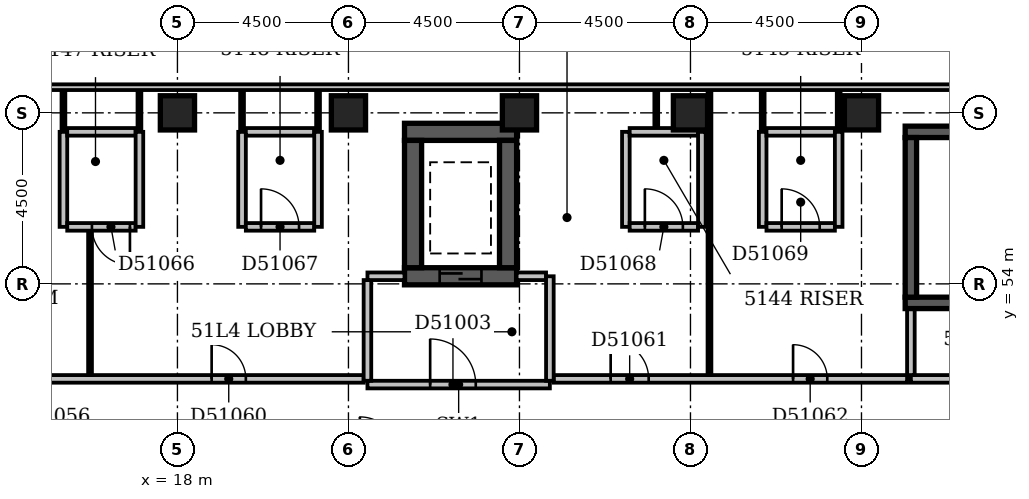
"""IFC4 building model, lengths in metres.
Left out: names, types, materials, properties, quantities, classifications, styles, units other than length and angle.
Written with IfcOpenShell. Run it as: python <this file> out.ifc"""

import sys

from ifc_helpers import new_model, si_unit, direction, frame, frame_2d, origin, origin_2d, place, context, subcontext, project, spatial, rectangle, extrude, element, fill, save


model = new_model("IFC4")
c1 = context("Model", 3, precision=1e-05, world=origin(), true_north=direction((0.0, 1.0)))
c2 = subcontext(c1, "Body", "Model", "MODEL_VIEW")
j1 = project(units=[si_unit("LENGTHUNIT", "METRE"), si_unit("PLANEANGLEUNIT", "RADIAN")], contexts=[c1])
p1 = place(None, origin())
s1 = spatial("IfcSite", under=j1, at=p1, CompositionType="ELEMENT")
p2 = place(p1, origin())
s2 = spatial("IfcBuilding", under=s1, at=p2, CompositionType="ELEMENT")
p3 = place(p2, frame((0.0, 0.0, 200.6)))
s3 = spatial("IfcBuildingStorey", under=s2, at=p3, CompositionType="ELEMENT", Elevation=200.6)
p4 = place(p3, frame((23.975, 54.2, -0.3), z_axis=(0.0, 0.0, 1.0), x_axis=(1.0, 0.0, 0.0)))
e1 = element("IfcWall", 1, at=p4, inside=s3, PredefinedType="SHEAR", context=c2, shape_type="SweptSolid", body=[
    extrude(rectangle(XDim=2.95, YDim=0.45, at=frame_2d((1.475, 0.0))), origin(), (0.0, 0.0, 1.0), 3.6),
])
p5 = place(p4, frame((0.925, 0.0, 0.3)))
e2 = element("IfcOpeningElement", 2, at=p5, cuts=e1, PredefinedType="OPENING", context=c2, shape_type="SweptSolid", body=[
    extrude(rectangle(XDim=1.1, YDim=2.1, at=frame_2d((0.55, 1.05))), frame((0.0, 0.237, 0.0), z_axis=(0.0, -1.0, 0.0), x_axis=(1.0, 0.0, 0.0)), (0.0, 0.0, 1.0), 0.474),
])
p6 = place(p3, frame((23.975, 58.0, -0.3), z_axis=(0.0, 0.0, 1.0), x_axis=(1.0, 0.0, 0.0)))
e3 = element("IfcWall", 3, at=p6, inside=s3, PredefinedType="SHEAR", context=c2, shape_type="SweptSolid", body=[
    extrude(rectangle(XDim=2.95, YDim=0.45, at=frame_2d((1.475, 0.0))), origin(), (0.0, 0.0, 1.0), 3.6),
])
for number, where, z_axis, x_axis in (
    (4, (24.2, 54.425, -0.3), (0.0, 0.0, 1.0), (0.0, 1.0, 0.0)),
    (5, (26.7, 54.425, -0.3), (0.0, 0.0, 1.0), (0.0, 1.0, 0.0)),
):
    element("IfcWall", number, at=place(p3, frame(where, z_axis=z_axis, x_axis=x_axis)), inside=s3, PredefinedType="SHEAR", context=c2, shape_type="SweptSolid", body=[
        extrude(rectangle(XDim=3.35, YDim=0.45, at=frame_2d((1.675, 0.0))), origin(), (0.0, 0.0, 1.0), 3.6),
    ])
p7 = place(p3, frame((37.15, 53.5, -0.3), z_axis=(0.0, 0.0, 1.0), x_axis=(1.0, 0.0, 0.0)))
e6 = element("IfcWall", 6, at=p7, inside=s3, PredefinedType="SHEAR", context=c2, shape_type="SweptSolid", body=[
    extrude(rectangle(XDim=7.0, YDim=0.3, at=frame_2d((3.5, 0.0))), origin(), (0.0, 0.0, 1.0), 3.6),
])
p8 = place(p7, frame((5.58, 0.0, 0.3)))
e7 = element("IfcOpeningElement", 7, at=p8, cuts=e6, PredefinedType="OPENING", context=c2, shape_type="SweptSolid", body=[
    extrude(rectangle(XDim=1.1, YDim=2.1, at=frame_2d((0.55, 1.05))), frame((0.0, 0.162, 0.0), z_axis=(0.0, -1.0, 0.0), x_axis=(1.0, 0.0, 0.0)), (0.0, 0.0, 1.0), 0.324),
])
p9 = place(p3, frame((37.15, 58.0, -0.3), z_axis=(0.0, 0.0, 1.0), x_axis=(1.0, 0.0, 0.0)))
e8 = element("IfcWall", 8, at=p9, inside=s3, PredefinedType="SHEAR", context=c2, shape_type="SweptSolid", body=[
    extrude(rectangle(XDim=7.4, YDim=0.3, at=frame_2d((3.7, 0.0))), origin(), (0.0, 0.0, 1.0), 3.6),
])
p10 = place(p3, frame((37.3, 53.65, -0.3), z_axis=(0.0, 0.0, 1.0), x_axis=(0.0, 1.0, 0.0)))
e9 = element("IfcWall", 9, at=p10, inside=s3, PredefinedType="SHEAR", context=c2, shape_type="SweptSolid", body=[
    extrude(rectangle(XDim=4.2, YDim=0.3, at=frame_2d((2.1, 0.0))), origin(), (0.0, 0.0, 1.0), 3.6),
])
for number, where, z_axis, x_axis in (
    (10, (18.0, 58.5, -0.3), (0.0, 0.0, 1.0), (1.0, 0.0, 0.0)),
    (11, (22.5, 58.5, -0.3), (0.0, 0.0, 1.0), (1.0, 0.0, 0.0)),
    (12, (27.0, 58.5, -0.3), (0.0, 0.0, 1.0), (1.0, 0.0, 0.0)),
    (13, (31.5, 58.5, -0.3), (0.0, 0.0, 1.0), (1.0, 0.0, 0.0)),
    (14, (36.0, 58.5, -0.3), (0.0, 0.0, 1.0), (1.0, 0.0, 0.0)),
):
    element("IfcColumn", number, at=place(p3, frame(where, z_axis=z_axis, x_axis=x_axis)), inside=s3, PredefinedType="COLUMN", context=c2, shape_type="SweptSolid", body=[
        extrude(rectangle(XDim=0.9, YDim=0.9, at=origin_2d()), origin(), (0.0, 0.0, 1.0), 3.6),
    ])
p11 = place(p3, frame((50.1, 59.175, 0.0), z_axis=(0.0, 0.0, 1.0), x_axis=(-1.0, 0.0, 0.0)))
e15 = element("IfcWall", 15, at=p11, inside=s3, PredefinedType="STANDARD", context=c2, shape_type="SweptSolid", body=[
    extrude(rectangle(XDim=50.85, YDim=0.15, at=frame_2d((25.425, 0.0))), origin(), (0.0, 0.0, 1.0), 2.7),
])
p12 = place(p3, frame((23.0, 51.35, 0.0), z_axis=(0.0, 0.0, 1.0), x_axis=(1.0, 0.0, 0.0)))
e16 = element("IfcWall", 16, at=p12, inside=s3, PredefinedType="PARTITIONING", context=c2, shape_type="SweptSolid", body=[
    extrude(rectangle(XDim=4.8, YDim=0.2, at=frame_2d((2.4, 0.0))), origin(), (0.0, 0.0, 1.0), 3.3),
])
p13 = place(p12, frame((1.65, 0.0, 0.0)))
e17 = element("IfcOpeningElement", 17, at=p13, cuts=e16, PredefinedType="OPENING", context=c2, shape_type="SweptSolid", body=[
    extrude(rectangle(XDim=1.2, YDim=2.1, at=frame_2d((0.6, 1.05))), frame((0.0, 0.112, 0.0), z_axis=(0.0, -1.0, 0.0), x_axis=(1.0, 0.0, 0.0)), (0.0, 0.0, 1.0), 0.224),
])
p14 = place(p3, frame((27.8, 51.45, 0.0), z_axis=(0.0, 0.0, 1.0), x_axis=(0.0, 1.0, 0.0)))
e18 = element("IfcWall", 18, at=p14, inside=s3, PredefinedType="PARTITIONING", context=c2, shape_type="SweptSolid", body=[
    extrude(rectangle(XDim=2.75, YDim=0.2, at=frame_2d((1.375, 0.0))), origin(), (0.0, 0.0, 1.0), 3.3),
])
p15 = place(p3, frame((23.0, 54.2, 0.0), z_axis=(0.0, 0.0, 1.0), x_axis=(1.0, 0.0, 0.0)))
e19 = element("IfcWall", 19, at=p15, inside=s3, PredefinedType="PARTITIONING", context=c2, shape_type="SweptSolid", body=[
    extrude(rectangle(XDim=0.975, YDim=0.2, at=frame_2d((0.488, 0.0))), origin(), (0.0, 0.0, 1.0), 3.3),
])
p16 = place(p3, frame((26.925, 54.2, 0.0), z_axis=(0.0, 0.0, 1.0), x_axis=(1.0, 0.0, 0.0)))
e20 = element("IfcWall", 20, at=p16, inside=s3, PredefinedType="PARTITIONING", context=c2, shape_type="SweptSolid", body=[
    extrude(rectangle(XDim=0.775, YDim=0.2, at=frame_2d((0.387, 0.0))), origin(), (0.0, 0.0, 1.0), 3.3),
])
p17 = place(p3, frame((23.0, 51.45, 0.0), z_axis=(0.0, 0.0, 1.0), x_axis=(0.0, 1.0, 0.0)))
e21 = element("IfcWall", 21, at=p17, inside=s3, PredefinedType="PARTITIONING", context=c2, shape_type="SweptSolid", body=[
    extrude(rectangle(XDim=2.65, YDim=0.2, at=frame_2d((1.325, 0.0))), origin(), (0.0, 0.0, 1.0), 3.3),
])
p18 = place(p3, frame((37.3, 51.5, 0.0), z_axis=(0.0, 0.0, 1.0), x_axis=(1.0, 0.0, 0.0)))
e22 = element("IfcWall", 22, at=p18, inside=s3, PredefinedType="PARTITIONING", context=c2, shape_type="SweptSolid", body=[
    extrude(rectangle(XDim=6.7, YDim=0.2, at=frame_2d((3.35, 0.0))), origin(), (0.0, 0.0, 1.0), 3.3),
])
p19 = place(p18, frame((2.75, 0.0, 0.0)))
e23 = element("IfcOpeningElement", 23, at=p19, cuts=e22, PredefinedType="OPENING", context=c2, shape_type="SweptSolid", body=[
    extrude(rectangle(XDim=1.2, YDim=2.1, at=frame_2d((0.6, 1.05))), frame((0.0, 0.112, 0.0), z_axis=(0.0, -1.0, 0.0), x_axis=(1.0, 0.0, 0.0)), (0.0, 0.0, 1.0), 0.224),
])
p20 = place(p3, frame((37.3, 51.6, 0.0), z_axis=(0.0, 0.0, 1.0), x_axis=(0.0, 1.0, 0.0)))
e24 = element("IfcWall", 24, at=p20, inside=s3, PredefinedType="PARTITIONING", context=c2, shape_type="SweptSolid", body=[
    extrude(rectangle(XDim=1.73, YDim=0.2, at=frame_2d((0.865, 0.0))), origin(), (0.0, 0.0, 1.0), 3.3),
])
p21 = place(p3, frame((7.6, 51.5, 0.0), z_axis=(0.0, 0.0, 1.0), x_axis=(1.0, 0.0, 0.0)))
e25 = element("IfcWall", 25, at=p21, inside=s3, PredefinedType="PARTITIONING", context=c2, shape_type="SweptSolid", body=[
    extrude(rectangle(XDim=15.3, YDim=0.2, at=frame_2d((7.65, 0.0))), origin(), (0.0, 0.0, 1.0), 3.3),
])
p22 = place(p21, frame((3.55, 0.0, 0.0)))
e26 = element("IfcOpeningElement", 26, at=p22, cuts=e25, PredefinedType="OPENING", context=c2, shape_type="SweptSolid", body=[
    extrude(rectangle(XDim=0.9, YDim=2.1, at=frame_2d((0.45, 1.05))), frame((0.0, 0.112, 0.0), z_axis=(0.0, -1.0, 0.0), x_axis=(1.0, 0.0, 0.0)), (0.0, 0.0, 1.0), 0.224),
])
p23 = place(p21, frame((11.3, 0.0, 0.0)))
e27 = element("IfcOpeningElement", 27, at=p23, cuts=e25, PredefinedType="OPENING", context=c2, shape_type="SweptSolid", body=[
    extrude(rectangle(XDim=0.9, YDim=2.1, at=frame_2d((0.45, 1.05))), frame((0.0, 0.112, 0.0), z_axis=(0.0, -1.0, 0.0), x_axis=(1.0, 0.0, 0.0)), (0.0, 0.0, 1.0), 0.224),
])
p24 = place(p3, frame((27.9, 51.5, 0.0), z_axis=(0.0, 0.0, 1.0), x_axis=(1.0, 0.0, 0.0)))
e28 = element("IfcWall", 28, at=p24, inside=s3, PredefinedType="PARTITIONING", context=c2, shape_type="SweptSolid", body=[
    extrude(rectangle(XDim=9.3, YDim=0.2, at=frame_2d((4.65, 0.0))), origin(), (0.0, 0.0, 1.0), 3.3),
])
p25 = place(p24, frame((1.5, 0.0, 0.0)))
e29 = element("IfcOpeningElement", 29, at=p25, cuts=e28, PredefinedType="OPENING", context=c2, shape_type="SweptSolid", body=[
    extrude(rectangle(XDim=1.0, YDim=2.1, at=frame_2d((0.5, 1.05))), frame((0.0, 0.112, 0.0), z_axis=(0.0, -1.0, 0.0), x_axis=(1.0, 0.0, 0.0)), (0.0, 0.0, 1.0), 0.224),
])
p26 = place(p24, frame((6.3, 0.0, 0.0)))
e30 = element("IfcOpeningElement", 30, at=p26, cuts=e28, PredefinedType="OPENING", context=c2, shape_type="SweptSolid", body=[
    extrude(rectangle(XDim=0.9, YDim=2.1, at=frame_2d((0.45, 1.05))), frame((0.0, 0.112, 0.0), z_axis=(0.0, -1.0, 0.0), x_axis=(1.0, 0.0, 0.0)), (0.0, 0.0, 1.0), 0.224),
])
p27 = place(p3, frame((15.7, 51.6, 0.0), z_axis=(0.0, 0.0, 1.0), x_axis=(0.0, 1.0, 0.0)))
e31 = element("IfcWall", 31, at=p27, inside=s3, PredefinedType="PARTITIONING", context=c2, shape_type="SweptSolid", body=[
    extrude(rectangle(XDim=3.8, YDim=0.1, at=frame_2d((1.9, 0.0))), origin(), (0.0, 0.0, 1.0), 3.3),
])
p28 = place(p3, frame((32.0, 51.6, 0.0), z_axis=(0.0, 0.0, 1.0), x_axis=(0.0, 1.0, 0.0)))
e32 = element("IfcWall", 32, at=p28, inside=s3, PredefinedType="PARTITIONING", context=c2, shape_type="SweptSolid", body=[
    extrude(rectangle(XDim=7.5, YDim=0.1, at=frame_2d((3.75, 0.0))), origin(), (0.0, 0.0, 1.0), 3.3),
])
p29 = place(p3, frame((15.0, 55.5, 0.0), z_axis=(0.0, 0.0, 1.0), x_axis=(0.0, 1.0, 0.0)))
e33 = element("IfcWall", 33, at=p29, inside=s3, PredefinedType="PARTITIONING", context=c2, shape_type="SweptSolid", body=[
    extrude(rectangle(XDim=2.5, YDim=0.2, at=frame_2d((1.25, 0.0))), origin(), (0.0, 0.0, 1.0), 3.3),
])
p30 = place(p3, frame((15.1, 55.5, 0.0), z_axis=(0.0, 0.0, 1.0), x_axis=(1.0, 0.0, 0.0)))
e34 = element("IfcWall", 34, at=p30, inside=s3, PredefinedType="PARTITIONING", context=c2, shape_type="SweptSolid", body=[
    extrude(rectangle(XDim=1.8, YDim=0.2, at=frame_2d((0.9, 0.0))), origin(), (0.0, 0.0, 1.0), 3.3),
])
p31 = place(p30, frame((0.65, 0.0, 0.0)))
e35 = element("IfcOpeningElement", 35, at=p31, cuts=e34, PredefinedType="OPENING", context=c2, shape_type="SweptSolid", body=[
    extrude(rectangle(XDim=1.0, YDim=2.1, at=frame_2d((0.5, 1.05))), frame((0.0, 0.112, 0.0), z_axis=(0.0, -1.0, 0.0), x_axis=(1.0, 0.0, 0.0)), (0.0, 0.0, 1.0), 0.224),
])
for number, where, z_axis, x_axis in (
    (36, (17.0, 55.5, 0.0), (0.0, 0.0, 1.0), (0.0, 1.0, 0.0)),
    (37, (19.7, 55.5, 0.0), (0.0, 0.0, 1.0), (0.0, 1.0, 0.0)),
):
    element("IfcWall", number, at=place(p3, frame(where, z_axis=z_axis, x_axis=x_axis)), inside=s3, PredefinedType="PARTITIONING", context=c2, shape_type="SweptSolid", body=[
        extrude(rectangle(XDim=2.5, YDim=0.2, at=frame_2d((1.25, 0.0))), origin(), (0.0, 0.0, 1.0), 3.3),
    ])
p32 = place(p3, frame((19.8, 55.5, 0.0), z_axis=(0.0, 0.0, 1.0), x_axis=(1.0, 0.0, 0.0)))
e38 = element("IfcWall", 38, at=p32, inside=s3, PredefinedType="PARTITIONING", context=c2, shape_type="SweptSolid", body=[
    extrude(rectangle(XDim=1.8, YDim=0.2, at=frame_2d((0.9, 0.0))), origin(), (0.0, 0.0, 1.0), 3.3),
])
p33 = place(p32, frame((0.4, 0.0, 0.0)))
e39 = element("IfcOpeningElement", 39, at=p33, cuts=e38, PredefinedType="OPENING", context=c2, shape_type="SweptSolid", body=[
    extrude(rectangle(XDim=1.0, YDim=2.1, at=frame_2d((0.5, 1.05))), frame((0.0, 0.112, 0.0), z_axis=(0.0, -1.0, 0.0), x_axis=(1.0, 0.0, 0.0)), (0.0, 0.0, 1.0), 0.224),
])
for number, where, z_axis, x_axis in (
    (40, (21.7, 55.5, 0.0), (0.0, 0.0, 1.0), (0.0, 1.0, 0.0)),
    (41, (29.8, 55.5, 0.0), (0.0, 0.0, 1.0), (0.0, 1.0, 0.0)),
):
    element("IfcWall", number, at=place(p3, frame(where, z_axis=z_axis, x_axis=x_axis)), inside=s3, PredefinedType="PARTITIONING", context=c2, shape_type="SweptSolid", body=[
        extrude(rectangle(XDim=2.5, YDim=0.2, at=frame_2d((1.25, 0.0))), origin(), (0.0, 0.0, 1.0), 3.3),
    ])
p34 = place(p3, frame((29.9, 55.5, 0.0), z_axis=(0.0, 0.0, 1.0), x_axis=(1.0, 0.0, 0.0)))
e42 = element("IfcWall", 42, at=p34, inside=s3, PredefinedType="PARTITIONING", context=c2, shape_type="SweptSolid", body=[
    extrude(rectangle(XDim=1.8, YDim=0.2, at=frame_2d((0.9, 0.0))), origin(), (0.0, 0.0, 1.0), 3.3),
])
p35 = place(p34, frame((0.4, 0.0, 0.0)))
e43 = element("IfcOpeningElement", 43, at=p35, cuts=e42, PredefinedType="OPENING", context=c2, shape_type="SweptSolid", body=[
    extrude(rectangle(XDim=1.0, YDim=2.1, at=frame_2d((0.5, 1.05))), frame((0.0, 0.112, 0.0), z_axis=(0.0, -1.0, 0.0), x_axis=(1.0, 0.0, 0.0)), (0.0, 0.0, 1.0), 0.224),
])
for number, where, z_axis, x_axis in (
    (44, (31.8, 55.5, 0.0), (0.0, 0.0, 1.0), (0.0, 1.0, 0.0)),
    (45, (33.4, 55.5, 0.0), (0.0, 0.0, 1.0), (0.0, 1.0, 0.0)),
):
    element("IfcWall", number, at=place(p3, frame(where, z_axis=z_axis, x_axis=x_axis)), inside=s3, PredefinedType="PARTITIONING", context=c2, shape_type="SweptSolid", body=[
        extrude(rectangle(XDim=2.5, YDim=0.2, at=frame_2d((1.25, 0.0))), origin(), (0.0, 0.0, 1.0), 3.3),
    ])
p36 = place(p3, frame((33.5, 55.5, 0.0), z_axis=(0.0, 0.0, 1.0), x_axis=(1.0, 0.0, 0.0)))
e46 = element("IfcWall", 46, at=p36, inside=s3, PredefinedType="PARTITIONING", context=c2, shape_type="SweptSolid", body=[
    extrude(rectangle(XDim=1.8, YDim=0.2, at=frame_2d((0.9, 0.0))), origin(), (0.0, 0.0, 1.0), 3.3),
])
p37 = place(p36, frame((0.4, 0.0, 0.0)))
e47 = element("IfcOpeningElement", 47, at=p37, cuts=e46, PredefinedType="OPENING", context=c2, shape_type="SweptSolid", body=[
    extrude(rectangle(XDim=1.0, YDim=2.1, at=frame_2d((0.5, 1.05))), frame((0.0, 0.112, 0.0), z_axis=(0.0, -1.0, 0.0), x_axis=(1.0, 0.0, 0.0)), (0.0, 0.0, 1.0), 0.224),
])
p38 = place(p3, frame((35.4, 55.5, 0.0), z_axis=(0.0, 0.0, 1.0), x_axis=(0.0, 1.0, 0.0)))
e48 = element("IfcWall", 48, at=p38, inside=s3, PredefinedType="PARTITIONING", context=c2, shape_type="SweptSolid", body=[
    extrude(rectangle(XDim=2.5, YDim=0.2, at=frame_2d((1.25, 0.0))), origin(), (0.0, 0.0, 1.0), 2.4),
])
p39 = place(p3, frame((15.0, 58.0, 0.0), z_axis=(0.0, 0.0, 1.0), x_axis=(0.0, 1.0, 0.0)))
e49 = element("IfcWall", 49, at=p39, inside=s3, PredefinedType="PARTITIONING", context=c2, shape_type="SweptSolid", body=[
    extrude(rectangle(XDim=1.1, YDim=0.1, at=frame_2d((0.55, 0.0))), origin(), (0.0, 0.0, 1.0), 3.3),
])
p40 = place(p3, frame((15.1, 58.0, 0.0), z_axis=(0.0, 0.0, 1.0), x_axis=(1.0, 0.0, 0.0)))
e50 = element("IfcWall", 50, at=p40, inside=s3, PredefinedType="PARTITIONING", context=c2, shape_type="SweptSolid", body=[
    extrude(rectangle(XDim=1.8, YDim=0.2, at=frame_2d((0.9, 0.0))), origin(), (0.0, 0.0, 1.0), 3.3),
])
for number, where, z_axis, x_axis in (
    (51, (17.0, 58.0, 0.0), (0.0, 0.0, 1.0), (0.0, 1.0, 0.0)),
    (52, (19.7, 58.0, 0.0), (0.0, 0.0, 1.0), (0.0, 1.0, 0.0)),
):
    element("IfcWall", number, at=place(p3, frame(where, z_axis=z_axis, x_axis=x_axis)), inside=s3, PredefinedType="PARTITIONING", context=c2, shape_type="SweptSolid", body=[
        extrude(rectangle(XDim=1.1, YDim=0.1, at=frame_2d((0.55, 0.0))), origin(), (0.0, 0.0, 1.0), 3.3),
    ])
p41 = place(p3, frame((19.8, 58.0, 0.0), z_axis=(0.0, 0.0, 1.0), x_axis=(1.0, 0.0, 0.0)))
e53 = element("IfcWall", 53, at=p41, inside=s3, PredefinedType="PARTITIONING", context=c2, shape_type="SweptSolid", body=[
    extrude(rectangle(XDim=1.8, YDim=0.2, at=frame_2d((0.9, 0.0))), origin(), (0.0, 0.0, 1.0), 3.3),
])
p42 = place(p3, frame((21.7, 58.0, 0.0), z_axis=(0.0, 0.0, 1.0), x_axis=(0.0, 1.0, 0.0)))
e54 = element("IfcWall", 54, at=p42, inside=s3, PredefinedType="PARTITIONING", context=c2, shape_type="SweptSolid", body=[
    extrude(rectangle(XDim=1.1, YDim=0.1, at=frame_2d((0.55, 0.0))), origin(), (0.0, 0.0, 1.0), 3.3),
])
p43 = place(p3, frame((29.9, 58.0, 0.0), z_axis=(0.0, 0.0, 1.0), x_axis=(1.0, 0.0, 0.0)))
e55 = element("IfcWall", 55, at=p43, inside=s3, PredefinedType="PARTITIONING", context=c2, shape_type="SweptSolid", body=[
    extrude(rectangle(XDim=1.8, YDim=0.2, at=frame_2d((0.9, 0.0))), origin(), (0.0, 0.0, 1.0), 3.3),
])
p44 = place(p3, frame((33.4, 58.0, 0.0), z_axis=(0.0, 0.0, 1.0), x_axis=(0.0, 1.0, 0.0)))
e56 = element("IfcWall", 56, at=p44, inside=s3, PredefinedType="PARTITIONING", context=c2, shape_type="SweptSolid", body=[
    extrude(rectangle(XDim=1.1, YDim=0.1, at=frame_2d((0.55, 0.0))), origin(), (0.0, 0.0, 1.0), 3.3),
])
p45 = place(p3, frame((33.5, 58.0, 0.0), z_axis=(0.0, 0.0, 1.0), x_axis=(1.0, 0.0, 0.0)))
e57 = element("IfcWall", 57, at=p45, inside=s3, PredefinedType="PARTITIONING", context=c2, shape_type="SweptSolid", body=[
    extrude(rectangle(XDim=1.8, YDim=0.2, at=frame_2d((0.9, 0.0))), origin(), (0.0, 0.0, 1.0), 3.3),
])
p46 = place(p3, frame((35.4, 58.0, 0.0), z_axis=(0.0, 0.0, 1.0), x_axis=(0.0, 1.0, 0.0)))
e58 = element("IfcWall", 58, at=p46, inside=s3, PredefinedType="PARTITIONING", context=c2, shape_type="SweptSolid", body=[
    extrude(rectangle(XDim=1.1, YDim=0.1, at=frame_2d((0.55, 0.0))), origin(), (0.0, 0.0, 1.0), 2.4),
])
p47 = place(p3, frame((30.6, 58.1, 0.0), z_axis=(0.0, 0.0, 1.0), x_axis=(0.0, 1.0, 0.0)))
e59 = element("IfcWall", 59, at=p47, inside=s3, PredefinedType="PARTITIONING", context=c2, shape_type="SweptSolid", body=[
    extrude(rectangle(XDim=1.0, YDim=0.1, at=frame_2d((0.5, 0.0))), origin(), (0.0, 0.0, 1.0), 3.3),
])
p48 = place(p13, origin())
e60 = element("IfcDoor", 60, at=p48, inside=s3, OperationType="SINGLE_SWING_LEFT", PredefinedType="DOOR", context=c2, shape_type="SweptSolid", body=[
    extrude(rectangle(XDim=1.2, YDim=2.1, at=frame_2d((0.6, 1.05))), frame((0.0, 0.025, 0.0), z_axis=(0.0, -1.0, 0.0), x_axis=(1.0, 0.0, 0.0)), (0.0, 0.0, 1.0), 0.05),
])
fill(e17, e60)
p49 = place(p5, origin())
e61 = element("IfcDoor", 61, at=p49, inside=s3, OperationType="SLIDING_TO_LEFT", PredefinedType="DOOR", context=c2, shape_type="SweptSolid", body=[
    extrude(rectangle(XDim=1.1, YDim=2.1, at=frame_2d((0.55, 1.05))), frame((0.0, 0.025, 0.0), z_axis=(0.0, -1.0, 0.0), x_axis=(1.0, 0.0, 0.0)), (0.0, 0.0, 1.0), 0.05),
])
fill(e2, e61)
p50 = place(p23, origin())
e62 = element("IfcDoor", 62, at=p50, inside=s3, OperationType="SINGLE_SWING_LEFT", PredefinedType="DOOR", context=c2, shape_type="SweptSolid", body=[
    extrude(rectangle(XDim=0.9, YDim=2.1, at=frame_2d((0.45, 1.05))), frame((0.0, 0.025, 0.0), z_axis=(0.0, -1.0, 0.0), x_axis=(1.0, 0.0, 0.0)), (0.0, 0.0, 1.0), 0.05),
])
fill(e27, e62)
p51 = place(p25, origin())
e63 = element("IfcDoor", 63, at=p51, inside=s3, OperationType="SINGLE_SWING_LEFT", PredefinedType="DOOR", context=c2, shape_type="SweptSolid", body=[
    extrude(rectangle(XDim=1.0, YDim=2.1, at=frame_2d((0.5, 1.05))), frame((0.0, 0.025, 0.0), z_axis=(0.0, -1.0, 0.0), x_axis=(1.0, 0.0, 0.0)), (0.0, 0.0, 1.0), 0.05),
])
fill(e29, e63)
p52 = place(p26, origin())
e64 = element("IfcDoor", 64, at=p52, inside=s3, OperationType="SINGLE_SWING_LEFT", PredefinedType="DOOR", context=c2, shape_type="SweptSolid", body=[
    extrude(rectangle(XDim=0.9, YDim=2.1, at=frame_2d((0.45, 1.05))), frame((0.0, 0.025, 0.0), z_axis=(0.0, -1.0, 0.0), x_axis=(1.0, 0.0, 0.0)), (0.0, 0.0, 1.0), 0.05),
])
fill(e30, e64)
p53 = place(p31, origin())
e65 = element("IfcDoor", 65, at=p53, inside=s3, OperationType="SINGLE_SWING_RIGHT", PredefinedType="DOOR", context=c2, shape_type="SweptSolid", body=[
    extrude(rectangle(XDim=1.0, YDim=2.1, at=frame_2d((0.5, 1.05))), frame((0.0, 0.025, 0.0), z_axis=(0.0, -1.0, 0.0), x_axis=(1.0, 0.0, 0.0)), (0.0, 0.0, 1.0), 0.05),
])
fill(e35, e65)
p54 = place(p33, origin())
e66 = element("IfcDoor", 66, at=p54, inside=s3, OperationType="SINGLE_SWING_LEFT", PredefinedType="DOOR", context=c2, shape_type="SweptSolid", body=[
    extrude(rectangle(XDim=1.0, YDim=2.1, at=frame_2d((0.5, 1.05))), frame((0.0, 0.025, 0.0), z_axis=(0.0, -1.0, 0.0), x_axis=(1.0, 0.0, 0.0)), (0.0, 0.0, 1.0), 0.05),
])
fill(e39, e66)
p55 = place(p35, origin())
e67 = element("IfcDoor", 67, at=p55, inside=s3, OperationType="SINGLE_SWING_LEFT", PredefinedType="DOOR", context=c2, shape_type="SweptSolid", body=[
    extrude(rectangle(XDim=1.0, YDim=2.1, at=frame_2d((0.5, 1.05))), frame((0.0, 0.025, 0.0), z_axis=(0.0, -1.0, 0.0), x_axis=(1.0, 0.0, 0.0)), (0.0, 0.0, 1.0), 0.05),
])
fill(e43, e67)
p56 = place(p37, origin())
e68 = element("IfcDoor", 68, at=p56, inside=s3, OperationType="SINGLE_SWING_LEFT", PredefinedType="DOOR", context=c2, shape_type="SweptSolid", body=[
    extrude(rectangle(XDim=1.0, YDim=2.1, at=frame_2d((0.5, 1.05))), frame((0.0, 0.025, 0.0), z_axis=(0.0, -1.0, 0.0), x_axis=(1.0, 0.0, 0.0)), (0.0, 0.0, 1.0), 0.05),
])
fill(e47, e68)
save(model, sys.argv[1])
